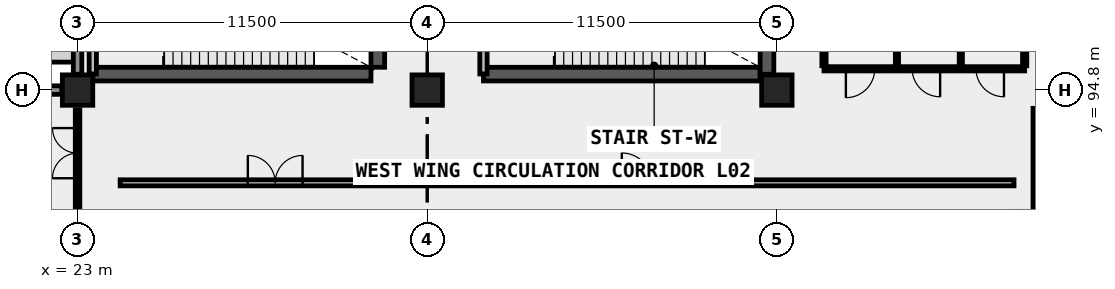
"""IFC4 building model, lengths in metres.
Left out: names, types, materials, properties, quantities, classifications, styles, units other than length and angle.
Written with IfcOpenShell. Run it as: python <this file> out.ifc"""

import sys

from ifc_helpers import new_model, si_unit, direction, frame, frame_2d, origin, origin_2d, place, context, subcontext, project, spatial, rectangle, extrude, element, fill, save


model = new_model("IFC4")
c1 = context("Model", 3, precision=1e-05, world=origin(), true_north=direction((0.0, 1.0)))
c2 = subcontext(c1, "Body", "Model", "MODEL_VIEW")
j1 = project(units=[si_unit("LENGTHUNIT", "METRE"), si_unit("PLANEANGLEUNIT", "RADIAN")], contexts=[c1])
p1 = place(None, origin())
s1 = spatial("IfcSite", under=j1, at=p1, CompositionType="ELEMENT")
p2 = place(p1, origin())
s2 = spatial("IfcBuilding", under=s1, at=p2, CompositionType="ELEMENT")
p3 = place(p2, frame((0.0, 0.0, 8.4)))
s3 = spatial("IfcBuildingStorey", under=s2, at=p3, CompositionType="ELEMENT", Elevation=8.4)
for number, where, z_axis, x_axis in (
    (1, (23.0, 94.8, 0.0), (0.0, 0.0, 1.0), (1.0, 0.0, 0.0)),
    (2, (34.5, 94.8, 0.0), (0.0, 0.0, 1.0), (1.0, 0.0, 0.0)),
    (3, (46.0, 94.8, 0.0), (0.0, 0.0, 1.0), (1.0, 0.0, 0.0)),
):
    element("IfcColumn", number, at=place(p3, frame(where, z_axis=z_axis, x_axis=x_axis)), inside=s3, PredefinedType="COLUMN", context=c2, shape_type="SweptSolid", body=[
        extrude(rectangle(XDim=1.0, YDim=1.0, at=origin_2d()), origin(), (0.0, 0.0, 1.0), 5.4),
    ])
p4 = place(p3, frame((23.5, 95.325, 0.0), z_axis=(0.0, 0.0, 1.0), x_axis=(1.0, 0.0, 0.0)))
e4 = element("IfcWall", 4, at=p4, inside=s3, PredefinedType="SHEAR", context=c2, shape_type="SweptSolid", body=[
    extrude(rectangle(XDim=9.15, YDim=0.45, at=frame_2d((4.575, 0.0))), origin(), (0.0, 0.0, 1.0), 5.4),
])
p5 = place(p3, frame((32.875, 95.55, 0.0), z_axis=(0.0, 0.0, 1.0), x_axis=(0.0, 1.0, 0.0)))
e5 = element("IfcWall", 5, at=p5, inside=s3, PredefinedType="SHEAR", context=c2, shape_type="SweptSolid", body=[
    extrude(rectangle(XDim=3.6, YDim=0.45, at=frame_2d((1.8, 0.0))), origin(), (0.0, 0.0, 1.0), 5.4),
])
p6 = place(p3, frame((36.35, 95.325, 0.0), z_axis=(0.0, 0.0, 1.0), x_axis=(1.0, 0.0, 0.0)))
e6 = element("IfcWall", 6, at=p6, inside=s3, PredefinedType="SHEAR", context=c2, shape_type="SweptSolid", body=[
    extrude(rectangle(XDim=9.1, YDim=0.45, at=frame_2d((4.55, 0.0))), origin(), (0.0, 0.0, 1.0), 5.4),
])
p7 = place(p3, frame((45.675, 95.32, 0.0), z_axis=(0.0, 0.0, 1.0), x_axis=(0.0, 1.0, 0.0)))
e7 = element("IfcWall", 7, at=p7, inside=s3, PredefinedType="SHEAR", context=c2, shape_type="SweptSolid", body=[
    extrude(rectangle(XDim=3.83, YDim=0.45, at=frame_2d((1.915, 0.0))), origin(), (0.0, 0.0, 1.0), 5.4),
])
p8 = place(p3, frame((23.0, 95.32, 0.0), z_axis=(0.0, 0.0, 1.0), x_axis=(0.0, 1.0, 0.0)))
e8 = element("IfcWall", 8, at=p8, inside=s3, PredefinedType="SOLIDWALL", context=c2, shape_type="SweptSolid", body=[
    extrude(rectangle(XDim=8.96, YDim=0.28, at=frame_2d((4.48, 0.0))), origin(), (0.0, 0.0, 1.0), 4.35),
])
p9 = place(p8, frame((1.553, 0.0, 0.85)))
e9 = element("IfcOpeningElement", 9, at=p9, cuts=e8, PredefinedType="OPENING", context=c2, shape_type="SweptSolid", body=[
    extrude(rectangle(XDim=2.15, YDim=1.95, at=frame_2d((1.075, 0.975))), frame((0.0, 0.15, 0.0), z_axis=(0.0, -1.0, 0.0), x_axis=(1.0, 0.0, 0.0)), (0.0, 0.0, 1.0), 0.3),
])
p10 = place(p8, frame((5.257, 0.0, 0.85)))
e10 = element("IfcOpeningElement", 10, at=p10, cuts=e8, PredefinedType="OPENING", context=c2, shape_type="SweptSolid", body=[
    extrude(rectangle(XDim=2.15, YDim=1.95, at=frame_2d((1.075, 0.975))), frame((0.0, 0.15, 0.0), z_axis=(0.0, -1.0, 0.0), x_axis=(1.0, 0.0, 0.0)), (0.0, 0.0, 1.0), 0.3),
])
p11 = place(p3, frame((12.02, 94.8, 0.0), z_axis=(0.0, 0.0, 1.0), x_axis=(1.0, 0.0, 0.0)))
e11 = element("IfcWall", 11, at=p11, inside=s3, PredefinedType="SOLIDWALL", context=c2, shape_type="SweptSolid", body=[
    extrude(rectangle(XDim=10.46, YDim=0.28, at=frame_2d((5.23, 0.0))), origin(), (0.0, 0.0, 1.0), 4.35),
])
p12 = place(p11, frame((1.002, 0.0, 0.85)))
e12 = element("IfcOpeningElement", 12, at=p12, cuts=e11, PredefinedType="OPENING", context=c2, shape_type="SweptSolid", body=[
    extrude(rectangle(XDim=2.15, YDim=1.95, at=frame_2d((1.075, 0.975))), frame((0.0, 0.15, 0.0), z_axis=(0.0, -1.0, 0.0), x_axis=(1.0, 0.0, 0.0)), (0.0, 0.0, 1.0), 0.3),
])
p13 = place(p11, frame((4.155, 0.0, 0.85)))
e13 = element("IfcOpeningElement", 13, at=p13, cuts=e11, PredefinedType="OPENING", context=c2, shape_type="SweptSolid", body=[
    extrude(rectangle(XDim=2.15, YDim=1.95, at=frame_2d((1.075, 0.975))), frame((0.0, 0.15, 0.0), z_axis=(0.0, -1.0, 0.0), x_axis=(1.0, 0.0, 0.0)), (0.0, 0.0, 1.0), 0.3),
])
p14 = place(p11, frame((7.308, 0.0, 0.85)))
e14 = element("IfcOpeningElement", 14, at=p14, cuts=e11, PredefinedType="OPENING", context=c2, shape_type="SweptSolid", body=[
    extrude(rectangle(XDim=2.15, YDim=1.95, at=frame_2d((1.075, 0.975))), frame((0.0, 0.15, 0.0), z_axis=(0.0, -1.0, 0.0), x_axis=(1.0, 0.0, 0.0)), (0.0, 0.0, 1.0), 0.3),
])
p15 = place(p3, frame((23.5, 95.33, 0.0), z_axis=(0.0, 0.0, 1.0), x_axis=(0.0, 1.0, 0.0)))
e15 = element("IfcWall", 15, at=p15, inside=s3, PredefinedType="SOLIDWALL", context=c2, shape_type="SweptSolid", body=[
    extrude(rectangle(XDim=4.04, YDim=0.24, at=frame_2d((2.02, 0.0))), origin(), (0.0, 0.0, 1.0), 5.12),
])
p16 = place(p15, frame((1.45, 0.0, 0.0)))
e16 = element("IfcOpeningElement", 16, at=p16, cuts=e15, PredefinedType="OPENING", context=c2, shape_type="SweptSolid", body=[
    extrude(rectangle(XDim=1.13, YDim=2.15, at=frame_2d((0.565, 1.075))), frame((0.0, 0.13, 0.0), z_axis=(0.0, -1.0, 0.0), x_axis=(1.0, 0.0, 0.0)), (0.0, 0.0, 1.0), 0.26),
])
p17 = place(p3, frame((36.35, 95.33, 0.0), z_axis=(0.0, 0.0, 1.0), x_axis=(0.0, 1.0, 0.0)))
e17 = element("IfcWall", 17, at=p17, inside=s3, PredefinedType="SOLIDWALL", context=c2, shape_type="SweptSolid", body=[
    extrude(rectangle(XDim=4.04, YDim=0.24, at=frame_2d((2.02, 0.0))), origin(), (0.0, 0.0, 1.0), 5.12),
])
p18 = place(p17, frame((1.45, 0.0, 0.0)))
e18 = element("IfcOpeningElement", 18, at=p18, cuts=e17, PredefinedType="OPENING", context=c2, shape_type="SweptSolid", body=[
    extrude(rectangle(XDim=1.13, YDim=2.15, at=frame_2d((0.565, 1.075))), frame((0.0, 0.13, 0.0), z_axis=(0.0, -1.0, 0.0), x_axis=(1.0, 0.0, 0.0)), (0.0, 0.0, 1.0), 0.26),
])
p19 = place(p3, frame((47.55, 95.5, 0.0), z_axis=(0.0, 0.0, 1.0), x_axis=(1.0, 0.0, 0.0)))
e19 = element("IfcWall", 19, at=p19, inside=s3, PredefinedType="PLUMBINGWALL", context=c2, shape_type="SweptSolid", body=[
    extrude(rectangle(XDim=6.6, YDim=0.14, at=frame_2d((3.3, 0.0))), origin(), (0.0, 0.0, 1.0), 5.12),
])
p20 = place(p19, frame((0.72, 0.0, 0.0)))
e20 = element("IfcOpeningElement", 20, at=p20, cuts=e19, PredefinedType="OPENING", context=c2, shape_type="SweptSolid", body=[
    extrude(rectangle(XDim=0.95, YDim=2.1, at=frame_2d((0.475, 1.05))), frame((0.0, 0.08, 0.0), z_axis=(0.0, -1.0, 0.0), x_axis=(1.0, 0.0, 0.0)), (0.0, 0.0, 1.0), 0.16),
])
p21 = place(p19, frame((2.9, 0.0, 0.0)))
e21 = element("IfcOpeningElement", 21, at=p21, cuts=e19, PredefinedType="OPENING", context=c2, shape_type="SweptSolid", body=[
    extrude(rectangle(XDim=0.92, YDim=2.1, at=frame_2d((0.46, 1.05))), frame((0.0, 0.08, 0.0), z_axis=(0.0, -1.0, 0.0), x_axis=(1.0, 0.0, 0.0)), (0.0, 0.0, 1.0), 0.16),
])
p22 = place(p19, frame((5.0, 0.0, 0.0)))
e22 = element("IfcOpeningElement", 22, at=p22, cuts=e19, PredefinedType="OPENING", context=c2, shape_type="SweptSolid", body=[
    extrude(rectangle(XDim=0.92, YDim=2.1, at=frame_2d((0.46, 1.05))), frame((0.0, 0.08, 0.0), z_axis=(0.0, -1.0, 0.0), x_axis=(1.0, 0.0, 0.0)), (0.0, 0.0, 1.0), 0.16),
])
p23 = place(p3, frame((47.55, 95.6, 0.0), z_axis=(0.0, 0.0, 1.0), x_axis=(0.0, 1.0, 0.0)))
e23 = element("IfcWall", 23, at=p23, inside=s3, PredefinedType="PLUMBINGWALL", context=c2, shape_type="SweptSolid", body=[
    extrude(rectangle(XDim=2.85, YDim=0.14, at=frame_2d((1.425, 0.0))), origin(), (0.0, 0.0, 1.0), 5.12),
])
p24 = place(p3, frame((49.95, 95.6, 0.0), z_axis=(0.0, 0.0, 1.0), x_axis=(0.0, 1.0, 0.0)))
e24 = element("IfcWall", 24, at=p24, inside=s3, PredefinedType="PARTITIONING", context=c2, shape_type="SweptSolid", body=[
    extrude(rectangle(XDim=2.85, YDim=0.105, at=frame_2d((1.425, 0.0))), origin(), (0.0, 0.0, 1.0), 4.6),
])
p25 = place(p3, frame((52.05, 95.6, 0.0), z_axis=(0.0, 0.0, 1.0), x_axis=(0.0, 1.0, 0.0)))
e25 = element("IfcWall", 25, at=p25, inside=s3, PredefinedType="PARTITIONING", context=c2, shape_type="SweptSolid", body=[
    extrude(rectangle(XDim=2.85, YDim=0.105, at=frame_2d((1.425, 0.0))), origin(), (0.0, 0.0, 1.0), 5.12),
])
p26 = place(p3, frame((54.15, 95.6, 0.0), z_axis=(0.0, 0.0, 1.0), x_axis=(0.0, 1.0, 0.0)))
e26 = element("IfcWall", 26, at=p26, inside=s3, PredefinedType="PLUMBINGWALL", context=c2, shape_type="SweptSolid", body=[
    extrude(rectangle(XDim=2.85, YDim=0.14, at=frame_2d((1.425, 0.0))), origin(), (0.0, 0.0, 1.0), 5.12),
])
p27 = place(p3, frame((24.4, 91.75, 0.0), z_axis=(0.0, 0.0, 1.0), x_axis=(1.0, 0.0, 0.0)))
e27 = element("IfcWall", 27, at=p27, inside=s3, PredefinedType="PARTITIONING", context=c2, shape_type="SweptSolid", body=[
    extrude(rectangle(XDim=29.4, YDim=0.2, at=frame_2d((14.7, 0.0))), origin(), (0.0, 0.0, 1.0), 5.12),
])
p28 = place(p27, frame((4.2, 0.0, 0.0)))
e28 = element("IfcOpeningElement", 28, at=p28, cuts=e27, PredefinedType="OPENING", context=c2, shape_type="SweptSolid", body=[
    extrude(rectangle(XDim=1.8, YDim=2.2, at=frame_2d((0.9, 1.1))), frame((0.0, 0.11, 0.0), z_axis=(0.0, -1.0, 0.0), x_axis=(1.0, 0.0, 0.0)), (0.0, 0.0, 1.0), 0.22),
])
p29 = place(p27, frame((16.5, 0.0, 0.0)))
e29 = element("IfcOpeningElement", 29, at=p29, cuts=e27, PredefinedType="OPENING", context=c2, shape_type="SweptSolid", body=[
    extrude(rectangle(XDim=0.98, YDim=2.15, at=frame_2d((0.49, 1.075))), frame((0.0, 0.11, 0.0), z_axis=(0.0, -1.0, 0.0), x_axis=(1.0, 0.0, 0.0)), (0.0, 0.0, 1.0), 0.22),
])
p30 = place(p3, frame((54.5, 86.4, 0.0), z_axis=(0.0, 0.0, 1.0), x_axis=(0.0, 1.0, 0.0)))
e30 = element("IfcWall", 30, at=p30, inside=s3, PredefinedType="PARTITIONING", context=c2, shape_type="SweptSolid", body=[
    extrude(rectangle(XDim=7.8, YDim=0.15, at=frame_2d((3.9, 0.0))), origin(), (0.0, 0.0, 1.0), 5.12),
])
p31 = place(p30, frame((2.8, 0.0, 0.0)))
e31 = element("IfcOpeningElement", 31, at=p31, cuts=e30, PredefinedType="OPENING", context=c2, shape_type="SweptSolid", body=[
    extrude(rectangle(XDim=1.65, YDim=2.2, at=frame_2d((0.825, 1.1))), frame((0.0, 0.085, 0.0), z_axis=(0.0, -1.0, 0.0), x_axis=(1.0, 0.0, 0.0)), (0.0, 0.0, 1.0), 0.17),
])
p32 = place(p3, frame((23.0, 86.45, 0.0), z_axis=(0.0, 0.0, 1.0), x_axis=(0.0, 1.0, 0.0)))
e32 = element("IfcWall", 32, at=p32, inside=s3, PredefinedType="PARTITIONING", context=c2, shape_type="SweptSolid", body=[
    extrude(rectangle(XDim=7.7, YDim=0.15, at=frame_2d((3.85, 0.0))), origin(), (0.0, 0.0, 1.0), 4.35),
])
p33 = place(p32, frame((5.45, 0.0, 0.0)))
e33 = element("IfcOpeningElement", 33, at=p33, cuts=e32, PredefinedType="OPENING", context=c2, shape_type="SweptSolid", body=[
    extrude(rectangle(XDim=1.65, YDim=2.2, at=frame_2d((0.825, 1.1))), frame((0.0, 0.085, 0.0), z_axis=(0.0, -1.0, 0.0), x_axis=(1.0, 0.0, 0.0)), (0.0, 0.0, 1.0), 0.17),
])
p34 = place(p20, frame((0.475, 0.0, 0.0), z_axis=(0.0, 0.0, 1.0), x_axis=(-1.0, 0.0, 0.0)))
e34 = element("IfcDoor", 34, at=p34, inside=s3, OperationType="SINGLE_SWING_LEFT", PredefinedType="DOOR", context=c2, shape_type="SweptSolid", body=[
    extrude(rectangle(XDim=0.95, YDim=2.1, at=frame_2d((0.0, 1.05))), frame((0.0, 0.025, 0.0), z_axis=(0.0, -1.0, 0.0), x_axis=(1.0, 0.0, 0.0)), (0.0, 0.0, 1.0), 0.05),
])
fill(e20, e34)
p35 = place(p21, origin())
e35 = element("IfcDoor", 35, at=p35, inside=s3, OperationType="SINGLE_SWING_RIGHT", PredefinedType="DOOR", context=c2, shape_type="SweptSolid", body=[
    extrude(rectangle(XDim=0.92, YDim=2.1, at=frame_2d((0.46, 1.05))), frame((0.0, 0.025, 0.0), z_axis=(0.0, -1.0, 0.0), x_axis=(1.0, 0.0, 0.0)), (0.0, 0.0, 1.0), 0.05),
])
fill(e21, e35)
p36 = place(p22, origin())
e36 = element("IfcDoor", 36, at=p36, inside=s3, OperationType="SINGLE_SWING_RIGHT", PredefinedType="DOOR", context=c2, shape_type="SweptSolid", body=[
    extrude(rectangle(XDim=0.92, YDim=2.1, at=frame_2d((0.46, 1.05))), frame((0.0, 0.025, 0.0), z_axis=(0.0, -1.0, 0.0), x_axis=(1.0, 0.0, 0.0)), (0.0, 0.0, 1.0), 0.05),
])
fill(e22, e36)
p37 = place(p28, origin())
e37 = element("IfcDoor", 37, at=p37, inside=s3, OperationType="DOUBLE_DOOR_SINGLE_SWING", PredefinedType="DOOR", context=c2, shape_type="SweptSolid", body=[
    extrude(rectangle(XDim=1.8, YDim=2.2, at=frame_2d((0.9, 1.1))), frame((0.0, 0.025, 0.0), z_axis=(0.0, -1.0, 0.0), x_axis=(1.0, 0.0, 0.0)), (0.0, 0.0, 1.0), 0.05),
])
fill(e28, e37)
p38 = place(p29, origin())
e38 = element("IfcDoor", 38, at=p38, inside=s3, OperationType="SINGLE_SWING_LEFT", PredefinedType="DOOR", context=c2, shape_type="SweptSolid", body=[
    extrude(rectangle(XDim=0.98, YDim=2.15, at=frame_2d((0.49, 1.075))), frame((0.0, 0.025, 0.0), z_axis=(0.0, -1.0, 0.0), x_axis=(1.0, 0.0, 0.0)), (0.0, 0.0, 1.0), 0.05),
])
fill(e29, e38)
p39 = place(p33, origin())
e39 = element("IfcDoor", 39, at=p39, inside=s3, OperationType="DOUBLE_DOOR_SINGLE_SWING", PredefinedType="DOOR", context=c2, shape_type="SweptSolid", body=[
    extrude(rectangle(XDim=1.65, YDim=2.2, at=frame_2d((0.825, 1.1))), frame((0.0, 0.025, 0.0), z_axis=(0.0, -1.0, 0.0), x_axis=(1.0, 0.0, 0.0)), (0.0, 0.0, 1.0), 0.05),
])
fill(e33, e39)
save(model, sys.argv[1])
